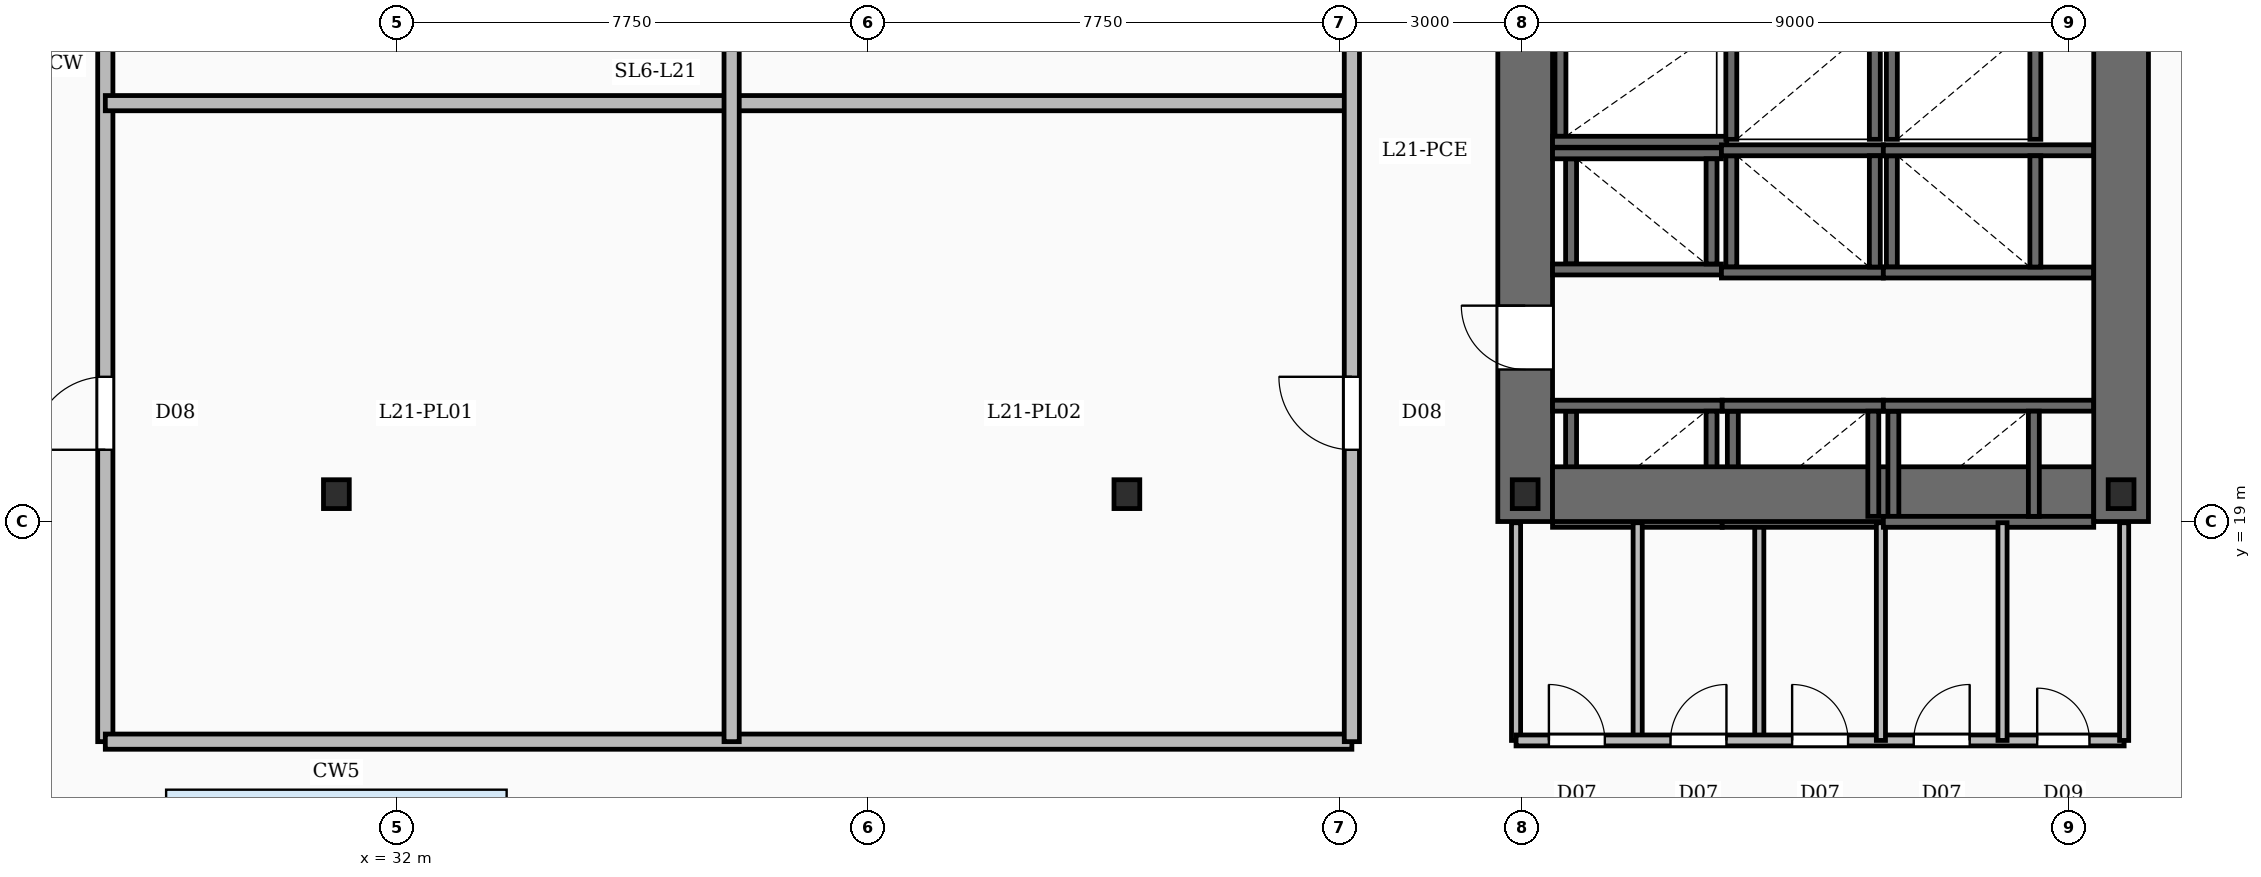
"""IFC4 building model, lengths in metres.
Left out: names, types, materials, properties, quantities, classifications, styles, units other than length and angle.
Written with IfcOpenShell. Run it as: python <this file> out.ifc"""

import sys

from ifc_helpers import new_model, si_unit, direction, frame, frame_2d, origin, origin_2d, place, context, subcontext, project, spatial, rectangle, i_section, extrude, element, fill, save


model = new_model("IFC4")
c1 = context("Model", 3, precision=1e-05, world=origin(), true_north=direction((0.0, 1.0)))
c2 = subcontext(c1, "Body", "Model", "MODEL_VIEW")
j1 = project(units=[si_unit("LENGTHUNIT", "METRE"), si_unit("PLANEANGLEUNIT", "RADIAN")], contexts=[c1])
p1 = place(None, origin())
s1 = spatial("IfcSite", under=j1, at=p1, CompositionType="ELEMENT")
p2 = place(p1, origin())
s2 = spatial("IfcBuilding", under=s1, at=p2, CompositionType="ELEMENT")
p3 = place(p2, frame((0.0, 0.0, 94.5)))
s3 = spatial("IfcBuildingStorey", under=s2, at=p3, CompositionType="ELEMENT", Elevation=94.5)
p4 = place(p3, frame((50.55, 19.0, -0.42), z_axis=(0.0, 0.0, 1.0), x_axis=(0.0, 1.0, 0.0)))
e1 = element("IfcWall", 1, at=p4, inside=s3, PredefinedType="SHEAR", context=c2, shape_type="SweptSolid", body=[
    extrude(rectangle(XDim=20.8, YDim=0.9, at=frame_2d((10.4, 0.0))), origin(), (0.0, 0.0, 1.0), 5.17),
])
p5 = place(p4, frame((2.5, 0.0, 0.42)))
e2 = element("IfcOpeningElement", 2, at=p5, cuts=e1, PredefinedType="OPENING", context=c2, shape_type="SweptSolid", body=[
    extrude(rectangle(XDim=1.05, YDim=2.15, at=frame_2d((0.525, 1.075))), frame((0.0, 0.46, 0.0), z_axis=(0.0, -1.0, 0.0), x_axis=(1.0, 0.0, 0.0)), (0.0, 0.0, 1.0), 0.92),
])
p6 = place(p4, frame((8.65, 0.0, 0.42)))
e3 = element("IfcOpeningElement", 3, at=p6, cuts=e1, PredefinedType="OPENING", context=c2, shape_type="SweptSolid", body=[
    extrude(rectangle(XDim=1.05, YDim=2.15, at=frame_2d((0.525, 1.075))), frame((0.0, 0.46, 0.0), z_axis=(0.0, -1.0, 0.0), x_axis=(1.0, 0.0, 0.0)), (0.0, 0.0, 1.0), 0.92),
])
p7 = place(p4, frame((14.62, 0.0, 0.42)))
e4 = element("IfcOpeningElement", 4, at=p7, cuts=e1, PredefinedType="OPENING", context=c2, shape_type="SweptSolid", body=[
    extrude(rectangle(XDim=1.1, YDim=2.15, at=frame_2d((0.55, 1.075))), frame((0.0, 0.46, 0.0), z_axis=(0.0, -1.0, 0.0), x_axis=(1.0, 0.0, 0.0)), (0.0, 0.0, 1.0), 0.92),
])
p8 = place(p3, frame((60.35, 19.0, -0.42), z_axis=(0.0, 0.0, 1.0), x_axis=(0.0, 1.0, 0.0)))
e5 = element("IfcWall", 5, at=p8, inside=s3, PredefinedType="SHEAR", context=c2, shape_type="SweptSolid", body=[
    extrude(rectangle(XDim=20.8, YDim=0.9, at=frame_2d((10.4, 0.0))), origin(), (0.0, 0.0, 1.0), 5.17),
])
p9 = place(p3, frame((51.0, 19.45, -0.42), z_axis=(0.0, 0.0, 1.0), x_axis=(1.0, 0.0, 0.0)))
e6 = element("IfcWall", 6, at=p9, inside=s3, PredefinedType="SHEAR", context=c2, shape_type="SweptSolid", body=[
    extrude(rectangle(XDim=8.9, YDim=0.9, at=frame_2d((4.45, 0.0))), origin(), (0.0, 0.0, 1.0), 5.17),
])
for number, where, z_axis, x_axis in (
    (7, (50.55, 19.45, -0.42), (0.0, 0.0, 1.0), (1.0, 0.0, 0.0)),
    (8, (60.35, 19.45, -0.42), (0.0, 0.0, 1.0), (1.0, 0.0, 0.0)),
    (9, (31.0, 19.45, -0.42), (0.0, 0.0, 1.0), (1.0, 0.0, 0.0)),
    (10, (44.0, 19.45, -0.42), (0.0, 0.0, 1.0), (1.0, 0.0, 0.0)),
):
    element("IfcColumn", number, at=place(p3, frame(where, z_axis=z_axis, x_axis=x_axis)), inside=s3, PredefinedType="COLUMN", context=c2, shape_type="SweptSolid", body=[
        extrude(i_section(OverallWidth=0.424, OverallDepth=0.474, WebThickness=0.048, FlangeThickness=0.077, FilletRadius=0.02, at=origin_2d()), origin(), (0.0, 0.0, 1.0), 5.17),
    ])
for number, where, z_axis, x_axis in (
    (11, (51.0, 20.905, 0.0), (0.0, 0.0, 1.0), (1.0, 0.0, 0.0)),
    (12, (51.0, 18.995, 0.0), (0.0, 0.0, 1.0), (1.0, 0.0, 0.0)),
):
    element("IfcWall", number, at=place(p3, frame(where, z_axis=z_axis, x_axis=x_axis)), inside=s3, PredefinedType="SOLIDWALL", context=c2, shape_type="SweptSolid", body=[
        extrude(rectangle(XDim=2.79, YDim=0.18, at=frame_2d((1.395, 0.0))), origin(), (0.0, 0.0, 1.0), 4.75),
    ])
for number, where, z_axis, x_axis in (
    (13, (51.305, 19.085, 0.0), (0.0, 0.0, 1.0), (0.0, 1.0, 0.0)),
    (14, (53.615, 19.085, 0.0), (0.0, 0.0, 1.0), (0.0, 1.0, 0.0)),
):
    element("IfcWall", number, at=place(p3, frame(where, z_axis=z_axis, x_axis=x_axis)), inside=s3, PredefinedType="SOLIDWALL", context=c2, shape_type="SweptSolid", body=[
        extrude(rectangle(XDim=1.73, YDim=0.18, at=frame_2d((0.865, 0.0))), origin(), (0.0, 0.0, 1.0), 4.75),
    ])
for number, where, z_axis, x_axis in (
    (15, (53.79, 20.905, 0.0), (0.0, 0.0, 1.0), (1.0, 0.0, 0.0)),
    (16, (53.79, 18.995, 0.0), (0.0, 0.0, 1.0), (1.0, 0.0, 0.0)),
):
    element("IfcWall", number, at=place(p3, frame(where, z_axis=z_axis, x_axis=x_axis)), inside=s3, PredefinedType="SOLIDWALL", context=c2, shape_type="SweptSolid", body=[
        extrude(rectangle(XDim=2.65, YDim=0.18, at=frame_2d((1.325, 0.0))), origin(), (0.0, 0.0, 1.0), 4.75),
    ])
for number, where, z_axis, x_axis in (
    (17, (53.965, 19.085, 0.0), (0.0, 0.0, 1.0), (0.0, 1.0, 0.0)),
    (18, (56.275, 19.085, 0.0), (0.0, 0.0, 1.0), (0.0, 1.0, 0.0)),
):
    element("IfcWall", number, at=place(p3, frame(where, z_axis=z_axis, x_axis=x_axis)), inside=s3, PredefinedType="SOLIDWALL", context=c2, shape_type="SweptSolid", body=[
        extrude(rectangle(XDim=1.73, YDim=0.18, at=frame_2d((0.865, 0.0))), origin(), (0.0, 0.0, 1.0), 4.75),
    ])
for number, where, z_axis, x_axis in (
    (19, (56.44, 20.905, 0.0), (0.0, 0.0, 1.0), (1.0, 0.0, 0.0)),
    (20, (56.44, 18.995, 0.0), (0.0, 0.0, 1.0), (1.0, 0.0, 0.0)),
):
    element("IfcWall", number, at=place(p3, frame(where, z_axis=z_axis, x_axis=x_axis)), inside=s3, PredefinedType="SOLIDWALL", context=c2, shape_type="SweptSolid", body=[
        extrude(rectangle(XDim=3.46, YDim=0.18, at=frame_2d((1.73, 0.0))), origin(), (0.0, 0.0, 1.0), 4.75),
    ])
for number, where, z_axis, x_axis in (
    (21, (56.605, 19.085, 0.0), (0.0, 0.0, 1.0), (0.0, 1.0, 0.0)),
    (22, (58.915, 19.085, 0.0), (0.0, 0.0, 1.0), (0.0, 1.0, 0.0)),
):
    element("IfcWall", number, at=place(p3, frame(where, z_axis=z_axis, x_axis=x_axis)), inside=s3, PredefinedType="SOLIDWALL", context=c2, shape_type="SweptSolid", body=[
        extrude(rectangle(XDim=1.73, YDim=0.18, at=frame_2d((0.865, 0.0))), origin(), (0.0, 0.0, 1.0), 4.75),
    ])
for number, where, z_axis, x_axis in (
    (23, (51.0, 25.055, 0.0), (0.0, 0.0, 1.0), (1.0, 0.0, 0.0)),
    (24, (51.0, 23.145, 0.0), (0.0, 0.0, 1.0), (1.0, 0.0, 0.0)),
):
    element("IfcWall", number, at=place(p3, frame(where, z_axis=z_axis, x_axis=x_axis)), inside=s3, PredefinedType="SOLIDWALL", context=c2, shape_type="SweptSolid", body=[
        extrude(rectangle(XDim=2.778, YDim=0.18, at=frame_2d((1.389, 0.0))), origin(), (0.0, 0.0, 1.0), 4.75),
    ])
for number, where, z_axis, x_axis in (
    (25, (51.305, 23.235, 0.0), (0.0, 0.0, 1.0), (0.0, 1.0, 0.0)),
    (26, (53.615, 23.235, 0.0), (0.0, 0.0, 1.0), (0.0, 1.0, 0.0)),
):
    element("IfcWall", number, at=place(p3, frame(where, z_axis=z_axis, x_axis=x_axis)), inside=s3, PredefinedType="SOLIDWALL", context=c2, shape_type="SweptSolid", body=[
        extrude(rectangle(XDim=1.73, YDim=0.18, at=frame_2d((0.865, 0.0))), origin(), (0.0, 0.0, 1.0), 4.75),
    ])
for number, where, z_axis, x_axis in (
    (27, (53.778, 25.105, 0.0), (0.0, 0.0, 1.0), (1.0, 0.0, 0.0)),
    (28, (53.778, 23.095, 0.0), (0.0, 0.0, 1.0), (1.0, 0.0, 0.0)),
):
    element("IfcWall", number, at=place(p3, frame(where, z_axis=z_axis, x_axis=x_axis)), inside=s3, PredefinedType="SOLIDWALL", context=c2, shape_type="SweptSolid", body=[
        extrude(rectangle(XDim=2.662, YDim=0.18, at=frame_2d((1.331, 0.0))), origin(), (0.0, 0.0, 1.0), 4.75),
    ])
for number, where, z_axis, x_axis in (
    (29, (53.94, 23.185, 0.0), (0.0, 0.0, 1.0), (0.0, 1.0, 0.0)),
    (30, (56.3, 23.185, 0.0), (0.0, 0.0, 1.0), (0.0, 1.0, 0.0)),
):
    element("IfcWall", number, at=place(p3, frame(where, z_axis=z_axis, x_axis=x_axis)), inside=s3, PredefinedType="SOLIDWALL", context=c2, shape_type="SweptSolid", body=[
        extrude(rectangle(XDim=1.83, YDim=0.18, at=frame_2d((0.915, 0.0))), origin(), (0.0, 0.0, 1.0), 4.75),
    ])
for number, where, z_axis, x_axis in (
    (31, (56.44, 25.105, 0.0), (0.0, 0.0, 1.0), (1.0, 0.0, 0.0)),
    (32, (56.44, 23.095, 0.0), (0.0, 0.0, 1.0), (1.0, 0.0, 0.0)),
):
    element("IfcWall", number, at=place(p3, frame(where, z_axis=z_axis, x_axis=x_axis)), inside=s3, PredefinedType="SOLIDWALL", context=c2, shape_type="SweptSolid", body=[
        extrude(rectangle(XDim=3.46, YDim=0.18, at=frame_2d((1.73, 0.0))), origin(), (0.0, 0.0, 1.0), 4.75),
    ])
for number, where, z_axis, x_axis in (
    (33, (56.58, 23.185, 0.0), (0.0, 0.0, 1.0), (0.0, 1.0, 0.0)),
    (34, (58.94, 23.185, 0.0), (0.0, 0.0, 1.0), (0.0, 1.0, 0.0)),
):
    element("IfcWall", number, at=place(p3, frame(where, z_axis=z_axis, x_axis=x_axis)), inside=s3, PredefinedType="SOLIDWALL", context=c2, shape_type="SweptSolid", body=[
        extrude(rectangle(XDim=1.83, YDim=0.18, at=frame_2d((0.915, 0.0))), origin(), (0.0, 0.0, 1.0), 4.75),
    ])
for number, where, z_axis, x_axis in (
    (35, (53.94, 25.285, 0.0), (0.0, 0.0, 1.0), (0.0, 1.0, 0.0)),
    (36, (56.3, 25.285, 0.0), (0.0, 0.0, 1.0), (0.0, 1.0, 0.0)),
    (37, (56.58, 25.285, 0.0), (0.0, 0.0, 1.0), (0.0, 1.0, 0.0)),
    (38, (58.94, 25.285, 0.0), (0.0, 0.0, 1.0), (0.0, 1.0, 0.0)),
):
    element("IfcWall", number, at=place(p3, frame(where, z_axis=z_axis, x_axis=x_axis)), inside=s3, PredefinedType="SOLIDWALL", context=c2, shape_type="SweptSolid", body=[
        extrude(rectangle(XDim=1.83, YDim=0.18, at=frame_2d((0.915, 0.0))), origin(), (0.0, 0.0, 1.0), 4.75),
    ])
p10 = place(p3, frame((51.0, 25.245, 0.0), z_axis=(0.0, 0.0, 1.0), x_axis=(1.0, 0.0, 0.0)))
e39 = element("IfcWall", 39, at=p10, inside=s3, PredefinedType="SOLIDWALL", context=c2, shape_type="SweptSolid", body=[
    extrude(rectangle(XDim=2.865, YDim=0.18, at=frame_2d((1.433, 0.0))), origin(), (0.0, 0.0, 1.0), 4.75),
])
p11 = place(p3, frame((51.13, 25.335, 0.0), z_axis=(0.0, 0.0, 1.0), x_axis=(0.0, 1.0, 0.0)))
e40 = element("IfcWall", 40, at=p11, inside=s3, PredefinedType="SOLIDWALL", context=c2, shape_type="SweptSolid", body=[
    extrude(rectangle(XDim=1.73, YDim=0.18, at=frame_2d((0.865, 0.0))), origin(), (0.0, 0.0, 1.0), 4.75),
])
for number, where, z_axis, x_axis in (
    (41, (52.4, 15.4, 0.0), (0.0, 0.0, 1.0), (0.0, 1.0, 0.0)),
    (42, (54.4, 15.4, 0.0), (0.0, 0.0, 1.0), (0.0, 1.0, 0.0)),
    (43, (56.4, 15.4, 0.0), (0.0, 0.0, 1.0), (0.0, 1.0, 0.0)),
    (44, (58.4, 15.4, 0.0), (0.0, 0.0, 1.0), (0.0, 1.0, 0.0)),
):
    element("IfcWall", number, at=place(p3, frame(where, z_axis=z_axis, x_axis=x_axis)), inside=s3, PredefinedType="PARTITIONING", context=c2, shape_type="SweptSolid", body=[
        extrude(rectangle(XDim=3.58, YDim=0.15, at=frame_2d((1.79, 0.0))), origin(), (0.0, 0.0, 1.0), 3.81),
    ])
p12 = place(p3, frame((50.4, 15.4, 0.0), z_axis=(0.0, 0.0, 1.0), x_axis=(1.0, 0.0, 0.0)))
e45 = element("IfcWall", 45, at=p12, inside=s3, PredefinedType="SOLIDWALL", context=c2, shape_type="SweptSolid", body=[
    extrude(rectangle(XDim=10.0, YDim=0.18, at=frame_2d((5.0, 0.0))), origin(), (0.0, 0.0, 1.0), 3.81),
])
p13 = place(p12, frame((0.54, 0.0, 0.0)))
e46 = element("IfcOpeningElement", 46, at=p13, cuts=e45, PredefinedType="OPENING", context=c2, shape_type="SweptSolid", body=[
    extrude(rectangle(XDim=0.92, YDim=2.1, at=frame_2d((0.46, 1.05))), frame((0.0, 0.1, 0.0), z_axis=(0.0, -1.0, 0.0), x_axis=(1.0, 0.0, 0.0)), (0.0, 0.0, 1.0), 0.2),
])
p14 = place(p12, frame((2.54, 0.0, 0.0)))
e47 = element("IfcOpeningElement", 47, at=p14, cuts=e45, PredefinedType="OPENING", context=c2, shape_type="SweptSolid", body=[
    extrude(rectangle(XDim=0.92, YDim=2.1, at=frame_2d((0.46, 1.05))), frame((0.0, 0.1, 0.0), z_axis=(0.0, -1.0, 0.0), x_axis=(1.0, 0.0, 0.0)), (0.0, 0.0, 1.0), 0.2),
])
p15 = place(p12, frame((4.54, 0.0, 0.0)))
e48 = element("IfcOpeningElement", 48, at=p15, cuts=e45, PredefinedType="OPENING", context=c2, shape_type="SweptSolid", body=[
    extrude(rectangle(XDim=0.92, YDim=2.1, at=frame_2d((0.46, 1.05))), frame((0.0, 0.1, 0.0), z_axis=(0.0, -1.0, 0.0), x_axis=(1.0, 0.0, 0.0)), (0.0, 0.0, 1.0), 0.2),
])
p16 = place(p12, frame((6.54, 0.0, 0.0)))
e49 = element("IfcOpeningElement", 49, at=p16, cuts=e45, PredefinedType="OPENING", context=c2, shape_type="SweptSolid", body=[
    extrude(rectangle(XDim=0.92, YDim=2.1, at=frame_2d((0.46, 1.05))), frame((0.0, 0.1, 0.0), z_axis=(0.0, -1.0, 0.0), x_axis=(1.0, 0.0, 0.0)), (0.0, 0.0, 1.0), 0.2),
])
p17 = place(p12, frame((8.57, 0.0, 0.0)))
e50 = element("IfcOpeningElement", 50, at=p17, cuts=e45, PredefinedType="OPENING", context=c2, shape_type="SweptSolid", body=[
    extrude(rectangle(XDim=0.86, YDim=2.05, at=frame_2d((0.43, 1.025))), frame((0.0, 0.1, 0.0), z_axis=(0.0, -1.0, 0.0), x_axis=(1.0, 0.0, 0.0)), (0.0, 0.0, 1.0), 0.2),
])
p18 = place(p3, frame((50.4, 15.4, 0.0), z_axis=(0.0, 0.0, 1.0), x_axis=(0.0, 1.0, 0.0)))
e51 = element("IfcWall", 51, at=p18, inside=s3, PredefinedType="PARTITIONING", context=c2, shape_type="SweptSolid", body=[
    extrude(rectangle(XDim=3.58, YDim=0.15, at=frame_2d((1.79, 0.0))), origin(), (0.0, 0.0, 1.0), 3.81),
])
p19 = place(p3, frame((60.4, 15.4, 0.0), z_axis=(0.0, 0.0, 1.0), x_axis=(0.0, 1.0, 0.0)))
e52 = element("IfcWall", 52, at=p19, inside=s3, PredefinedType="PARTITIONING", context=c2, shape_type="SweptSolid", body=[
    extrude(rectangle(XDim=3.58, YDim=0.15, at=frame_2d((1.79, 0.0))), origin(), (0.0, 0.0, 1.0), 2.8),
])
p20 = place(p3, frame((37.5, 15.38, 0.0), z_axis=(0.0, 0.0, 1.0), x_axis=(0.0, 1.0, 0.0)))
e53 = element("IfcWall", 53, at=p20, inside=s3, PredefinedType="SOLIDWALL", context=c2, shape_type="SweptSolid", body=[
    extrude(rectangle(XDim=20.84, YDim=0.25, at=frame_2d((10.42, 0.0))), origin(), (0.0, 0.0, 1.0), 3.81),
])
for number, where, z_axis, x_axis in (
    (54, (27.2, 25.88, 0.0), (0.0, 0.0, 1.0), (1.0, 0.0, 0.0)),
    (55, (27.2, 15.38, 0.0), (0.0, 0.0, 1.0), (1.0, 0.0, 0.0)),
):
    element("IfcWall", number, at=place(p3, frame(where, z_axis=z_axis, x_axis=x_axis)), inside=s3, PredefinedType="SOLIDWALL", context=c2, shape_type="SweptSolid", body=[
        extrude(rectangle(XDim=20.5, YDim=0.25, at=frame_2d((10.25, 0.0))), origin(), (0.0, 0.0, 1.0), 3.81),
    ])
p21 = place(p3, frame((27.2, 15.38, 0.0), z_axis=(0.0, 0.0, 1.0), x_axis=(0.0, 1.0, 0.0)))
e56 = element("IfcWall", 56, at=p21, inside=s3, PredefinedType="SOLIDWALL", context=c2, shape_type="SweptSolid", body=[
    extrude(rectangle(XDim=20.84, YDim=0.25, at=frame_2d((10.42, 0.0))), origin(), (0.0, 0.0, 1.0), 3.81),
])
p22 = place(p21, frame((4.8, 0.0, 0.0)))
e57 = element("IfcOpeningElement", 57, at=p22, cuts=e56, PredefinedType="OPENING", context=c2, shape_type="SweptSolid", body=[
    extrude(rectangle(XDim=1.2, YDim=2.2, at=frame_2d((0.6, 1.1))), frame((0.0, 0.135, 0.0), z_axis=(0.0, -1.0, 0.0), x_axis=(1.0, 0.0, 0.0)), (0.0, 0.0, 1.0), 0.27),
])
p23 = place(p21, frame((14.5, 0.0, 0.0)))
e58 = element("IfcOpeningElement", 58, at=p23, cuts=e56, PredefinedType="OPENING", context=c2, shape_type="SweptSolid", body=[
    extrude(rectangle(XDim=1.2, YDim=2.2, at=frame_2d((0.6, 1.1))), frame((0.0, 0.135, 0.0), z_axis=(0.0, -1.0, 0.0), x_axis=(1.0, 0.0, 0.0)), (0.0, 0.0, 1.0), 0.27),
])
p24 = place(p3, frame((47.7, 15.38, 0.0), z_axis=(0.0, 0.0, 1.0), x_axis=(0.0, 1.0, 0.0)))
e59 = element("IfcWall", 59, at=p24, inside=s3, PredefinedType="SOLIDWALL", context=c2, shape_type="SweptSolid", body=[
    extrude(rectangle(XDim=20.84, YDim=0.25, at=frame_2d((10.42, 0.0))), origin(), (0.0, 0.0, 1.0), 3.81),
])
p25 = place(p24, frame((4.8, 0.0, 0.0)))
e60 = element("IfcOpeningElement", 60, at=p25, cuts=e59, PredefinedType="OPENING", context=c2, shape_type="SweptSolid", body=[
    extrude(rectangle(XDim=1.2, YDim=2.2, at=frame_2d((0.6, 1.1))), frame((0.0, 0.135, 0.0), z_axis=(0.0, -1.0, 0.0), x_axis=(1.0, 0.0, 0.0)), (0.0, 0.0, 1.0), 0.27),
])
p26 = place(p24, frame((14.5, 0.0, 0.0)))
e61 = element("IfcOpeningElement", 61, at=p26, cuts=e59, PredefinedType="OPENING", context=c2, shape_type="SweptSolid", body=[
    extrude(rectangle(XDim=1.2, YDim=2.2, at=frame_2d((0.6, 1.1))), frame((0.0, 0.135, 0.0), z_axis=(0.0, -1.0, 0.0), x_axis=(1.0, 0.0, 0.0)), (0.0, 0.0, 1.0), 0.27),
])
p27 = place(p5, origin())
e62 = element("IfcDoor", 62, at=p27, inside=s3, OperationType="SINGLE_SWING_RIGHT", PredefinedType="DOOR", context=c2, shape_type="SweptSolid", body=[
    extrude(rectangle(XDim=1.05, YDim=2.15, at=frame_2d((0.525, 1.075))), frame((0.0, 0.025, 0.0), z_axis=(0.0, -1.0, 0.0), x_axis=(1.0, 0.0, 0.0)), (0.0, 0.0, 1.0), 0.05),
])
fill(e2, e62)
p28 = place(p13, origin())
e63 = element("IfcDoor", 63, at=p28, inside=s3, OperationType="SINGLE_SWING_LEFT", PredefinedType="DOOR", context=c2, shape_type="SweptSolid", body=[
    extrude(rectangle(XDim=0.92, YDim=2.1, at=frame_2d((0.46, 1.05))), frame((0.0, 0.025, 0.0), z_axis=(0.0, -1.0, 0.0), x_axis=(1.0, 0.0, 0.0)), (0.0, 0.0, 1.0), 0.05),
])
fill(e46, e63)
p29 = place(p14, origin())
e64 = element("IfcDoor", 64, at=p29, inside=s3, OperationType="SINGLE_SWING_RIGHT", PredefinedType="DOOR", context=c2, shape_type="SweptSolid", body=[
    extrude(rectangle(XDim=0.92, YDim=2.1, at=frame_2d((0.46, 1.05))), frame((0.0, 0.025, 0.0), z_axis=(0.0, -1.0, 0.0), x_axis=(1.0, 0.0, 0.0)), (0.0, 0.0, 1.0), 0.05),
])
fill(e47, e64)
p30 = place(p15, origin())
e65 = element("IfcDoor", 65, at=p30, inside=s3, OperationType="SINGLE_SWING_LEFT", PredefinedType="DOOR", context=c2, shape_type="SweptSolid", body=[
    extrude(rectangle(XDim=0.92, YDim=2.1, at=frame_2d((0.46, 1.05))), frame((0.0, 0.025, 0.0), z_axis=(0.0, -1.0, 0.0), x_axis=(1.0, 0.0, 0.0)), (0.0, 0.0, 1.0), 0.05),
])
fill(e48, e65)
p31 = place(p16, origin())
e66 = element("IfcDoor", 66, at=p31, inside=s3, OperationType="SINGLE_SWING_RIGHT", PredefinedType="DOOR", context=c2, shape_type="SweptSolid", body=[
    extrude(rectangle(XDim=0.92, YDim=2.1, at=frame_2d((0.46, 1.05))), frame((0.0, 0.025, 0.0), z_axis=(0.0, -1.0, 0.0), x_axis=(1.0, 0.0, 0.0)), (0.0, 0.0, 1.0), 0.05),
])
fill(e49, e66)
p32 = place(p17, origin())
e67 = element("IfcDoor", 67, at=p32, inside=s3, OperationType="SINGLE_SWING_LEFT", PredefinedType="DOOR", context=c2, shape_type="SweptSolid", body=[
    extrude(rectangle(XDim=0.86, YDim=2.05, at=frame_2d((0.43, 1.025))), frame((0.0, 0.025, 0.0), z_axis=(0.0, -1.0, 0.0), x_axis=(1.0, 0.0, 0.0)), (0.0, 0.0, 1.0), 0.05),
])
fill(e50, e67)
p33 = place(p22, origin())
e68 = element("IfcDoor", 68, at=p33, inside=s3, OperationType="SINGLE_SWING_LEFT", PredefinedType="DOOR", context=c2, shape_type="SweptSolid", body=[
    extrude(rectangle(XDim=1.2, YDim=2.2, at=frame_2d((0.6, 1.1))), frame((0.0, 0.025, 0.0), z_axis=(0.0, -1.0, 0.0), x_axis=(1.0, 0.0, 0.0)), (0.0, 0.0, 1.0), 0.05),
])
fill(e57, e68)
p34 = place(p25, origin())
e69 = element("IfcDoor", 69, at=p34, inside=s3, OperationType="SINGLE_SWING_RIGHT", PredefinedType="DOOR", context=c2, shape_type="SweptSolid", body=[
    extrude(rectangle(XDim=1.2, YDim=2.2, at=frame_2d((0.6, 1.1))), frame((0.0, 0.025, 0.0), z_axis=(0.0, -1.0, 0.0), x_axis=(1.0, 0.0, 0.0)), (0.0, 0.0, 1.0), 0.05),
])
fill(e60, e69)
save(model, sys.argv[1])
